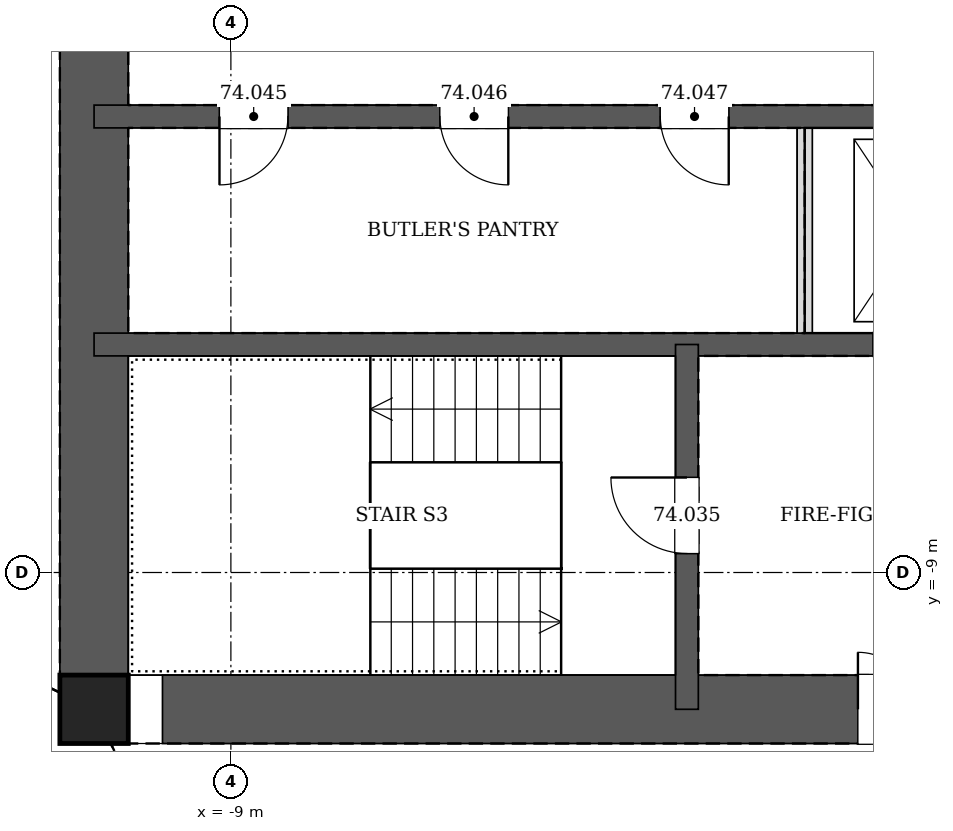
"""IFC4 building model, lengths in metres.
Left out: names, types, materials, properties, quantities, classifications, styles, units other than length and angle.
Written with IfcOpenShell. Run it as: python <this file> out.ifc"""

import sys

from ifc_helpers import new_model, si_unit, direction, frame, frame_2d, origin, origin_2d, place, context, subcontext, project, spatial, rectangle, hollow_rectangle, extrude, element, fill, save


model = new_model("IFC4")
c1 = context("Model", 3, precision=1e-05, world=origin(), true_north=direction((0.0, 1.0)))
c2 = subcontext(c1, "Body", "Model", "MODEL_VIEW")
j1 = project(units=[si_unit("LENGTHUNIT", "METRE"), si_unit("PLANEANGLEUNIT", "RADIAN")], contexts=[c1])
p1 = place(None, origin())
s1 = spatial("IfcSite", under=j1, at=p1, CompositionType="ELEMENT")
p2 = place(p1, origin())
s2 = spatial("IfcBuilding", under=s1, at=p2, CompositionType="ELEMENT")
p3 = place(p2, frame((0.0, 0.0, 301.4)))
s3 = spatial("IfcBuildingStorey", under=s2, at=p3, CompositionType="ELEMENT", Elevation=301.4)
p4 = place(p3, frame((-10.8, -10.8, 0.0), z_axis=(0.0, 0.0, 1.0), x_axis=(1.0, 0.0, 0.0)))
e1 = element("IfcColumn", 1, at=p4, inside=s3, PredefinedType="COLUMN", context=c2, shape_type="SweptSolid", body=[
    extrude(hollow_rectangle(XDim=0.9, YDim=0.9, WallThickness=0.04, at=origin_2d()), origin(), (0.0, 0.0, 1.0), 3.4),
])
p5 = place(p3, frame((-10.8, -10.8, 0.0), z_axis=(0.0, 0.0, 1.0), x_axis=(1.0, 0.0, 0.0)))
e2 = element("IfcWall", 2, at=p5, inside=s3, PredefinedType="SOLIDWALL", context=c2, shape_type="SweptSolid", body=[
    extrude(rectangle(XDim=21.6, YDim=0.9, at=frame_2d((10.8, 0.0))), origin(), (0.0, 0.0, 1.0), 3.4),
])
p6 = place(p5, frame((10.05, 0.0, 0.0)))
e3 = element("IfcOpeningElement", 3, at=p6, cuts=e2, PredefinedType="OPENING", context=c2, shape_type="SweptSolid", body=[
    extrude(rectangle(XDim=1.5, YDim=2.1, at=frame_2d((0.75, 1.05))), frame((0.0, 0.46, 0.0), z_axis=(0.0, -1.0, 0.0), x_axis=(1.0, 0.0, 0.0)), (0.0, 0.0, 1.0), 0.92),
])
p7 = place(p5, frame((17.1, 0.0, 0.0)))
e4 = element("IfcOpeningElement", 4, at=p7, cuts=e2, PredefinedType="OPENING", context=c2, shape_type="SweptSolid", body=[
    extrude(rectangle(XDim=0.9, YDim=2.1, at=frame_2d((0.45, 1.05))), frame((0.0, 0.46, 0.0), z_axis=(0.0, -1.0, 0.0), x_axis=(1.0, 0.0, 0.0)), (0.0, 0.0, 1.0), 0.92),
])
p8 = place(p3, frame((-10.8, 10.8, 0.0), z_axis=(0.0, 0.0, 1.0), x_axis=(0.0, -1.0, 0.0)))
e5 = element("IfcWall", 5, at=p8, inside=s3, PredefinedType="SOLIDWALL", context=c2, shape_type="SweptSolid", body=[
    extrude(rectangle(XDim=21.6, YDim=0.9, at=frame_2d((10.8, 0.0))), origin(), (0.0, 0.0, 1.0), 3.4),
])
p9 = place(p8, frame((8.7, 0.0, 0.0)))
e6 = element("IfcOpeningElement", 6, at=p9, cuts=e5, PredefinedType="OPENING", context=c2, shape_type="SweptSolid", body=[
    extrude(rectangle(XDim=1.2, YDim=2.1, at=frame_2d((0.6, 1.05))), frame((0.0, 0.46, 0.0), z_axis=(0.0, -1.0, 0.0), x_axis=(1.0, 0.0, 0.0)), (0.0, 0.0, 1.0), 0.92),
])
p10 = place(p8, frame((11.7, 0.0, 0.0)))
e7 = element("IfcOpeningElement", 7, at=p10, cuts=e5, PredefinedType="OPENING", context=c2, shape_type="SweptSolid", body=[
    extrude(rectangle(XDim=1.2, YDim=2.1, at=frame_2d((0.6, 1.05))), frame((0.0, 0.46, 0.0), z_axis=(0.0, -1.0, 0.0), x_axis=(1.0, 0.0, 0.0)), (0.0, 0.0, 1.0), 0.92),
])
p11 = place(p3, frame((-10.8, -3.0, 0.0), z_axis=(0.0, 0.0, 1.0), x_axis=(1.0, 0.0, 0.0)))
e8 = element("IfcWall", 8, at=p11, inside=s3, PredefinedType="SOLIDWALL", context=c2, shape_type="SweptSolid", body=[
    extrude(rectangle(XDim=21.6, YDim=0.3, at=frame_2d((10.8, 0.0))), origin(), (0.0, 0.0, 1.0), 3.4),
])
p12 = place(p11, frame((13.25, 0.0, 0.0)))
e9 = element("IfcOpeningElement", 9, at=p12, cuts=e8, PredefinedType="OPENING", context=c2, shape_type="SweptSolid", body=[
    extrude(rectangle(XDim=0.9, YDim=2.1, at=frame_2d((0.45, 1.05))), frame((0.0, 0.16, 0.0), z_axis=(0.0, -1.0, 0.0), x_axis=(1.0, 0.0, 0.0)), (0.0, 0.0, 1.0), 0.32),
])
p13 = place(p11, frame((1.65, 0.0, 0.0)))
e10 = element("IfcOpeningElement", 10, at=p13, cuts=e8, PredefinedType="OPENING", context=c2, shape_type="SweptSolid", body=[
    extrude(rectangle(XDim=0.9, YDim=2.1, at=frame_2d((0.45, 1.05))), frame((0.0, 0.16, 0.0), z_axis=(0.0, -1.0, 0.0), x_axis=(1.0, 0.0, 0.0)), (0.0, 0.0, 1.0), 0.32),
])
p14 = place(p11, frame((4.55, 0.0, 0.0)))
e11 = element("IfcOpeningElement", 11, at=p14, cuts=e8, PredefinedType="OPENING", context=c2, shape_type="SweptSolid", body=[
    extrude(rectangle(XDim=0.9, YDim=2.1, at=frame_2d((0.45, 1.05))), frame((0.0, 0.16, 0.0), z_axis=(0.0, -1.0, 0.0), x_axis=(1.0, 0.0, 0.0)), (0.0, 0.0, 1.0), 0.32),
])
p15 = place(p11, frame((7.45, 0.0, 0.0)))
e12 = element("IfcOpeningElement", 12, at=p15, cuts=e8, PredefinedType="OPENING", context=c2, shape_type="SweptSolid", body=[
    extrude(rectangle(XDim=0.9, YDim=2.1, at=frame_2d((0.45, 1.05))), frame((0.0, 0.16, 0.0), z_axis=(0.0, -1.0, 0.0), x_axis=(1.0, 0.0, 0.0)), (0.0, 0.0, 1.0), 0.32),
])
p16 = place(p11, frame((16.05, 0.0, 0.0)))
e13 = element("IfcOpeningElement", 13, at=p16, cuts=e8, PredefinedType="OPENING", context=c2, shape_type="SweptSolid", body=[
    extrude(rectangle(XDim=1.1, YDim=2.1, at=frame_2d((0.55, 1.05))), frame((0.0, 0.16, 0.0), z_axis=(0.0, -1.0, 0.0), x_axis=(1.0, 0.0, 0.0)), (0.0, 0.0, 1.0), 0.32),
])
p17 = place(p11, frame((18.95, 0.0, 0.0)))
e14 = element("IfcOpeningElement", 14, at=p17, cuts=e8, PredefinedType="OPENING", context=c2, shape_type="SweptSolid", body=[
    extrude(rectangle(XDim=1.1, YDim=2.1, at=frame_2d((0.55, 1.05))), frame((0.0, 0.16, 0.0), z_axis=(0.0, -1.0, 0.0), x_axis=(1.0, 0.0, 0.0)), (0.0, 0.0, 1.0), 0.32),
])
p18 = place(p3, frame((-10.8, -6.0, 0.0), z_axis=(0.0, 0.0, 1.0), x_axis=(1.0, 0.0, 0.0)))
e15 = element("IfcWall", 15, at=p18, inside=s3, PredefinedType="SOLIDWALL", context=c2, shape_type="SweptSolid", body=[
    extrude(rectangle(XDim=21.6, YDim=0.3, at=frame_2d((10.8, 0.0))), origin(), (0.0, 0.0, 1.0), 3.4),
])
p19 = place(p18, frame((10.25, 0.0, 0.0)))
e16 = element("IfcOpeningElement", 16, at=p19, cuts=e15, PredefinedType="OPENING", context=c2, shape_type="SweptSolid", body=[
    extrude(rectangle(XDim=1.1, YDim=2.1, at=frame_2d((0.55, 1.05))), frame((0.0, 0.16, 0.0), z_axis=(0.0, -1.0, 0.0), x_axis=(1.0, 0.0, 0.0)), (0.0, 0.0, 1.0), 0.32),
])
p20 = place(p3, frame((-3.0, -6.0, 0.0), z_axis=(0.0, 0.0, 1.0), x_axis=(0.0, -1.0, 0.0)))
e17 = element("IfcWall", 17, at=p20, inside=s3, PredefinedType="SOLIDWALL", context=c2, shape_type="SweptSolid", body=[
    extrude(rectangle(XDim=4.8, YDim=0.3, at=frame_2d((2.4, 0.0))), origin(), (0.0, 0.0, 1.0), 3.4),
])
p21 = place(p20, frame((1.75, 0.0, 0.0)))
e18 = element("IfcOpeningElement", 18, at=p21, cuts=e17, PredefinedType="OPENING", context=c2, shape_type="SweptSolid", body=[
    extrude(rectangle(XDim=1.0, YDim=2.1, at=frame_2d((0.5, 1.05))), frame((0.0, 0.16, 0.0), z_axis=(0.0, -1.0, 0.0), x_axis=(1.0, 0.0, 0.0)), (0.0, 0.0, 1.0), 0.32),
])
p22 = place(p3, frame((-1.45, -5.85, 0.0), z_axis=(0.0, 0.0, 1.0), x_axis=(0.0, 1.0, 0.0)))
e19 = element("IfcWall", 19, at=p22, inside=s3, PredefinedType="PARTITIONING", context=c2, shape_type="SweptSolid", body=[
    extrude(rectangle(XDim=2.7, YDim=0.2, at=frame_2d((1.35, 0.0))), origin(), (0.0, 0.0, 1.0), 3.2),
])
p23 = place(p6, origin())
e20 = element("IfcDoor", 20, at=p23, inside=s3, OperationType="DOUBLE_DOOR_SINGLE_SWING", PredefinedType="DOOR", context=c2, shape_type="SweptSolid", body=[
    extrude(rectangle(XDim=1.5, YDim=2.1, at=frame_2d((0.75, 1.05))), frame((0.0, 0.025, 0.0), z_axis=(0.0, -1.0, 0.0), x_axis=(1.0, 0.0, 0.0)), (0.0, 0.0, 1.0), 0.05),
])
fill(e3, e20)
p24 = place(p21, frame((1.0, 0.0, 0.0), z_axis=(0.0, 0.0, 1.0), x_axis=(-1.0, 0.0, 0.0)))
e21 = element("IfcDoor", 21, at=p24, inside=s3, OperationType="SINGLE_SWING_RIGHT", PredefinedType="DOOR", context=c2, shape_type="SweptSolid", body=[
    extrude(rectangle(XDim=1.0, YDim=2.1, at=frame_2d((0.5, 1.05))), frame((0.0, 0.025, 0.0), z_axis=(0.0, -1.0, 0.0), x_axis=(1.0, 0.0, 0.0)), (0.0, 0.0, 1.0), 0.05),
])
fill(e18, e21)
p25 = place(p13, frame((0.9, 0.0, 0.0), z_axis=(0.0, 0.0, 1.0), x_axis=(-1.0, 0.0, 0.0)))
e22 = element("IfcDoor", 22, at=p25, inside=s3, OperationType="SINGLE_SWING_RIGHT", PredefinedType="DOOR", context=c2, shape_type="SweptSolid", body=[
    extrude(rectangle(XDim=0.9, YDim=2.1, at=frame_2d((0.45, 1.05))), frame((0.0, 0.025, 0.0), z_axis=(0.0, -1.0, 0.0), x_axis=(1.0, 0.0, 0.0)), (0.0, 0.0, 1.0), 0.05),
])
fill(e10, e22)
p26 = place(p14, frame((0.9, 0.0, 0.0), z_axis=(0.0, 0.0, 1.0), x_axis=(-1.0, 0.0, 0.0)))
e23 = element("IfcDoor", 23, at=p26, inside=s3, OperationType="SINGLE_SWING_LEFT", PredefinedType="DOOR", context=c2, shape_type="SweptSolid", body=[
    extrude(rectangle(XDim=0.9, YDim=2.1, at=frame_2d((0.45, 1.05))), frame((0.0, 0.025, 0.0), z_axis=(0.0, -1.0, 0.0), x_axis=(1.0, 0.0, 0.0)), (0.0, 0.0, 1.0), 0.05),
])
fill(e11, e23)
p27 = place(p15, frame((0.9, 0.0, 0.0), z_axis=(0.0, 0.0, 1.0), x_axis=(-1.0, 0.0, 0.0)))
e24 = element("IfcDoor", 24, at=p27, inside=s3, OperationType="SINGLE_SWING_LEFT", PredefinedType="DOOR", context=c2, shape_type="SweptSolid", body=[
    extrude(rectangle(XDim=0.9, YDim=2.1, at=frame_2d((0.45, 1.05))), frame((0.0, 0.025, 0.0), z_axis=(0.0, -1.0, 0.0), x_axis=(1.0, 0.0, 0.0)), (0.0, 0.0, 1.0), 0.05),
])
fill(e12, e24)
save(model, sys.argv[1])
